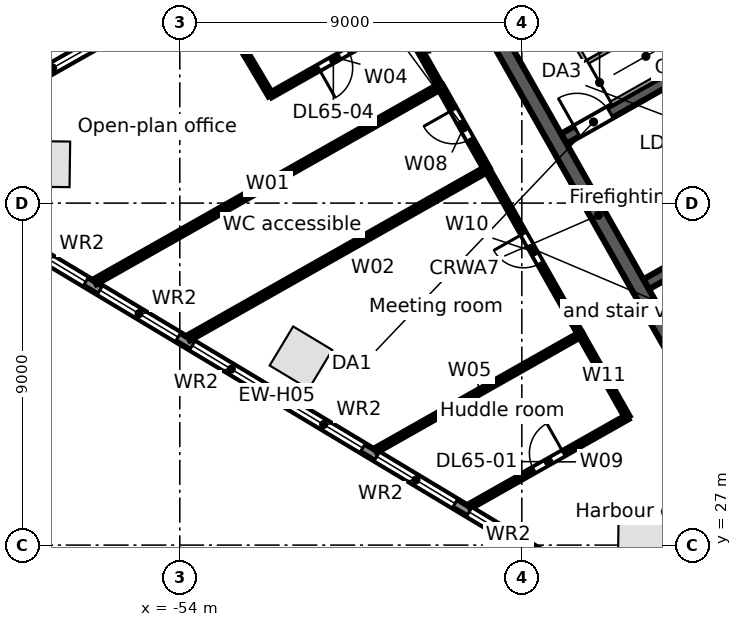
"""IFC4 building model, lengths in metres.
Left out: names, types, materials, properties, quantities, classifications, styles, units other than length and angle.
Written with IfcOpenShell. Run it as: python <this file> out.ifc"""

import sys

from ifc_helpers import new_model, si_unit, direction, frame, frame_2d, origin, origin_2d, place, context, subcontext, project, spatial, rectangle, extrude, element, fill, save


model = new_model("IFC4")
c1 = context("Model", 3, precision=1e-05, world=origin(), true_north=direction((0.0, 1.0)))
c2 = subcontext(c1, "Body", "Model", "MODEL_VIEW")
j1 = project(units=[si_unit("LENGTHUNIT", "METRE"), si_unit("PLANEANGLEUNIT", "RADIAN")], contexts=[c1])
p1 = place(None, origin())
s1 = spatial("IfcSite", under=j1, at=p1, CompositionType="ELEMENT")
p2 = place(p1, origin())
s2 = spatial("IfcBuilding", under=s1, at=p2, CompositionType="ELEMENT")
p3 = place(p2, frame((0.0, 0.0, 293.1)))
s3 = spatial("IfcBuildingStorey", under=s2, at=p3, CompositionType="ELEMENT", Elevation=293.1)
for number, where, z_axis, x_axis in (
    (1, (-57.493, 37.027, 0.0), (0.0, 0.0, 1.0), (-0.013, -1.0, 0.0)),
    (2, (-50.812, 31.931, 0.0), (0.0, 0.0, 1.0), (0.857, -0.515, 0.0)),
    (3, (-41.858, 27.495, 0.0), (0.0, 0.0, 1.0), (1.0, -0.013, 0.0)),
):
    element("IfcColumn", number, at=place(p3, frame(where, z_axis=z_axis, x_axis=x_axis)), inside=s3, PredefinedType="COLUMN", context=c2, shape_type="SweptSolid", body=[
        extrude(rectangle(XDim=1.2, YDim=1.2, at=origin_2d()), origin(), (0.0, 0.0, 1.0), 3.8),
    ])
p4 = place(p3, frame((-58.732, 38.771, 0.0), z_axis=(0.0, 0.0, 1.0), x_axis=(0.870355615581, 0.492423702137, 0.0)))
e4 = element("IfcWall", 4, at=p4, inside=s3, PredefinedType="STANDARD", context=c2, shape_type="SweptSolid", body=[
    extrude(rectangle(XDim=64.052, YDim=0.25, at=frame_2d((32.026, 0.0))), origin(), (0.0, 0.0, 1.0), 3.52),
])
p5 = place(p4, frame((61.259, 0.0, 0.8)))
e5 = element("IfcOpeningElement", 5, at=p5, cuts=e4, PredefinedType="OPENING", context=c2, shape_type="SweptSolid", body=[
    extrude(rectangle(XDim=2.4, YDim=2.2, at=frame_2d((1.2, 1.1))), frame((0.0, 0.135, 0.0), z_axis=(0.0, -1.0, 0.0), x_axis=(1.0, 0.0, 0.0)), (0.0, 0.0, 1.0), 0.27),
])
p6 = place(p4, frame((58.216, 0.0, 0.8)))
e6 = element("IfcOpeningElement", 6, at=p6, cuts=e4, PredefinedType="OPENING", context=c2, shape_type="SweptSolid", body=[
    extrude(rectangle(XDim=2.4, YDim=2.2, at=frame_2d((1.2, 1.1))), frame((0.0, 0.135, 0.0), z_axis=(0.0, -1.0, 0.0), x_axis=(1.0, 0.0, 0.0)), (0.0, 0.0, 1.0), 0.27),
])
p7 = place(p4, frame((55.173, 0.0, 0.8)))
e7 = element("IfcOpeningElement", 7, at=p7, cuts=e4, PredefinedType="OPENING", context=c2, shape_type="SweptSolid", body=[
    extrude(rectangle(XDim=2.4, YDim=2.2, at=frame_2d((1.2, 1.1))), frame((0.0, 0.135, 0.0), z_axis=(0.0, -1.0, 0.0), x_axis=(1.0, 0.0, 0.0)), (0.0, 0.0, 1.0), 0.27),
])
p8 = place(p4, frame((52.129, 0.0, 0.8)))
e8 = element("IfcOpeningElement", 8, at=p8, cuts=e4, PredefinedType="OPENING", context=c2, shape_type="SweptSolid", body=[
    extrude(rectangle(XDim=2.4, YDim=2.2, at=frame_2d((1.2, 1.1))), frame((0.0, 0.135, 0.0), z_axis=(0.0, -1.0, 0.0), x_axis=(1.0, 0.0, 0.0)), (0.0, 0.0, 1.0), 0.27),
])
p9 = place(p4, frame((49.086, 0.0, 0.8)))
e9 = element("IfcOpeningElement", 9, at=p9, cuts=e4, PredefinedType="OPENING", context=c2, shape_type="SweptSolid", body=[
    extrude(rectangle(XDim=2.4, YDim=2.2, at=frame_2d((1.2, 1.1))), frame((0.0, 0.135, 0.0), z_axis=(0.0, -1.0, 0.0), x_axis=(1.0, 0.0, 0.0)), (0.0, 0.0, 1.0), 0.27),
])
p10 = place(p4, frame((46.043, 0.0, 0.8)))
e10 = element("IfcOpeningElement", 10, at=p10, cuts=e4, PredefinedType="OPENING", context=c2, shape_type="SweptSolid", body=[
    extrude(rectangle(XDim=2.4, YDim=2.2, at=frame_2d((1.2, 1.1))), frame((0.0, 0.135, 0.0), z_axis=(0.0, -1.0, 0.0), x_axis=(1.0, 0.0, 0.0)), (0.0, 0.0, 1.0), 0.27),
])
p11 = place(p4, frame((43.0, 0.0, 0.8)))
e11 = element("IfcOpeningElement", 11, at=p11, cuts=e4, PredefinedType="OPENING", context=c2, shape_type="SweptSolid", body=[
    extrude(rectangle(XDim=2.4, YDim=2.2, at=frame_2d((1.2, 1.1))), frame((0.0, 0.135, 0.0), z_axis=(0.0, -1.0, 0.0), x_axis=(1.0, 0.0, 0.0)), (0.0, 0.0, 1.0), 0.27),
])
p12 = place(p4, frame((39.956, 0.0, 0.8)))
e12 = element("IfcOpeningElement", 12, at=p12, cuts=e4, PredefinedType="OPENING", context=c2, shape_type="SweptSolid", body=[
    extrude(rectangle(XDim=2.4, YDim=2.2, at=frame_2d((1.2, 1.1))), frame((0.0, 0.135, 0.0), z_axis=(0.0, -1.0, 0.0), x_axis=(1.0, 0.0, 0.0)), (0.0, 0.0, 1.0), 0.27),
])
p13 = place(p4, frame((36.913, 0.0, 0.8)))
e13 = element("IfcOpeningElement", 13, at=p13, cuts=e4, PredefinedType="OPENING", context=c2, shape_type="SweptSolid", body=[
    extrude(rectangle(XDim=2.4, YDim=2.2, at=frame_2d((1.2, 1.1))), frame((0.0, 0.135, 0.0), z_axis=(0.0, -1.0, 0.0), x_axis=(1.0, 0.0, 0.0)), (0.0, 0.0, 1.0), 0.27),
])
p14 = place(p4, frame((33.87, 0.0, 0.8)))
e14 = element("IfcOpeningElement", 14, at=p14, cuts=e4, PredefinedType="OPENING", context=c2, shape_type="SweptSolid", body=[
    extrude(rectangle(XDim=2.4, YDim=2.2, at=frame_2d((1.2, 1.1))), frame((0.0, 0.135, 0.0), z_axis=(0.0, -1.0, 0.0), x_axis=(1.0, 0.0, 0.0)), (0.0, 0.0, 1.0), 0.27),
])
p15 = place(p4, frame((30.826, 0.0, 0.8)))
e15 = element("IfcOpeningElement", 15, at=p15, cuts=e4, PredefinedType="OPENING", context=c2, shape_type="SweptSolid", body=[
    extrude(rectangle(XDim=2.4, YDim=2.2, at=frame_2d((1.2, 1.1))), frame((0.0, 0.135, 0.0), z_axis=(0.0, -1.0, 0.0), x_axis=(1.0, 0.0, 0.0)), (0.0, 0.0, 1.0), 0.27),
])
p16 = place(p4, frame((27.783, 0.0, 0.8)))
e16 = element("IfcOpeningElement", 16, at=p16, cuts=e4, PredefinedType="OPENING", context=c2, shape_type="SweptSolid", body=[
    extrude(rectangle(XDim=2.4, YDim=2.2, at=frame_2d((1.2, 1.1))), frame((0.0, 0.135, 0.0), z_axis=(0.0, -1.0, 0.0), x_axis=(1.0, 0.0, 0.0)), (0.0, 0.0, 1.0), 0.27),
])
p17 = place(p4, frame((24.74, 0.0, 0.8)))
e17 = element("IfcOpeningElement", 17, at=p17, cuts=e4, PredefinedType="OPENING", context=c2, shape_type="SweptSolid", body=[
    extrude(rectangle(XDim=2.4, YDim=2.2, at=frame_2d((1.2, 1.1))), frame((0.0, 0.135, 0.0), z_axis=(0.0, -1.0, 0.0), x_axis=(1.0, 0.0, 0.0)), (0.0, 0.0, 1.0), 0.27),
])
p18 = place(p4, frame((21.696, 0.0, 0.8)))
e18 = element("IfcOpeningElement", 18, at=p18, cuts=e4, PredefinedType="OPENING", context=c2, shape_type="SweptSolid", body=[
    extrude(rectangle(XDim=2.4, YDim=2.2, at=frame_2d((1.2, 1.1))), frame((0.0, 0.135, 0.0), z_axis=(0.0, -1.0, 0.0), x_axis=(1.0, 0.0, 0.0)), (0.0, 0.0, 1.0), 0.27),
])
p19 = place(p4, frame((18.653, 0.0, 0.8)))
e19 = element("IfcOpeningElement", 19, at=p19, cuts=e4, PredefinedType="OPENING", context=c2, shape_type="SweptSolid", body=[
    extrude(rectangle(XDim=2.4, YDim=2.2, at=frame_2d((1.2, 1.1))), frame((0.0, 0.135, 0.0), z_axis=(0.0, -1.0, 0.0), x_axis=(1.0, 0.0, 0.0)), (0.0, 0.0, 1.0), 0.27),
])
p20 = place(p4, frame((15.61, 0.0, 0.8)))
e20 = element("IfcOpeningElement", 20, at=p20, cuts=e4, PredefinedType="OPENING", context=c2, shape_type="SweptSolid", body=[
    extrude(rectangle(XDim=2.4, YDim=2.2, at=frame_2d((1.2, 1.1))), frame((0.0, 0.135, 0.0), z_axis=(0.0, -1.0, 0.0), x_axis=(1.0, 0.0, 0.0)), (0.0, 0.0, 1.0), 0.27),
])
p21 = place(p4, frame((12.567, 0.0, 0.8)))
e21 = element("IfcOpeningElement", 21, at=p21, cuts=e4, PredefinedType="OPENING", context=c2, shape_type="SweptSolid", body=[
    extrude(rectangle(XDim=2.4, YDim=2.2, at=frame_2d((1.2, 1.1))), frame((0.0, 0.135, 0.0), z_axis=(0.0, -1.0, 0.0), x_axis=(1.0, 0.0, 0.0)), (0.0, 0.0, 1.0), 0.27),
])
p22 = place(p4, frame((9.523, 0.0, 0.8)))
e22 = element("IfcOpeningElement", 22, at=p22, cuts=e4, PredefinedType="OPENING", context=c2, shape_type="SweptSolid", body=[
    extrude(rectangle(XDim=2.4, YDim=2.2, at=frame_2d((1.2, 1.1))), frame((0.0, 0.135, 0.0), z_axis=(0.0, -1.0, 0.0), x_axis=(1.0, 0.0, 0.0)), (0.0, 0.0, 1.0), 0.27),
])
p23 = place(p4, frame((6.48, 0.0, 0.8)))
e23 = element("IfcOpeningElement", 23, at=p23, cuts=e4, PredefinedType="OPENING", context=c2, shape_type="SweptSolid", body=[
    extrude(rectangle(XDim=2.4, YDim=2.2, at=frame_2d((1.2, 1.1))), frame((0.0, 0.135, 0.0), z_axis=(0.0, -1.0, 0.0), x_axis=(1.0, 0.0, 0.0)), (0.0, 0.0, 1.0), 0.27),
])
p24 = place(p4, frame((3.437, 0.0, 0.8)))
e24 = element("IfcOpeningElement", 24, at=p24, cuts=e4, PredefinedType="OPENING", context=c2, shape_type="SweptSolid", body=[
    extrude(rectangle(XDim=2.4, YDim=2.2, at=frame_2d((1.2, 1.1))), frame((0.0, 0.135, 0.0), z_axis=(0.0, -1.0, 0.0), x_axis=(1.0, 0.0, 0.0)), (0.0, 0.0, 1.0), 0.27),
])
p25 = place(p4, frame((0.393, 0.0, 0.8)))
e25 = element("IfcOpeningElement", 25, at=p25, cuts=e4, PredefinedType="OPENING", context=c2, shape_type="SweptSolid", body=[
    extrude(rectangle(XDim=2.4, YDim=2.2, at=frame_2d((1.2, 1.1))), frame((0.0, 0.135, 0.0), z_axis=(0.0, -1.0, 0.0), x_axis=(1.0, 0.0, 0.0)), (0.0, 0.0, 1.0), 0.27),
])
p26 = place(p3, frame((-44.115, 26.507, 0.0), z_axis=(0.0, 0.0, 1.0), x_axis=(-0.857166583633, 0.515039268311, 0.0)))
e26 = element("IfcWall", 26, at=p26, inside=s3, PredefinedType="STANDARD", context=c2, shape_type="SweptSolid", body=[
    extrude(rectangle(XDim=17.106, YDim=0.25, at=frame_2d((8.553, 0.0))), origin(), (0.0, 0.0, 1.0), 3.52),
])
p27 = place(p26, frame((14.417, 0.0, 0.8)))
e27 = element("IfcOpeningElement", 27, at=p27, cuts=e26, PredefinedType="OPENING", context=c2, shape_type="SweptSolid", body=[
    extrude(rectangle(XDim=2.4, YDim=2.2, at=frame_2d((1.2, 1.1))), frame((0.0, 0.135, 0.0), z_axis=(0.0, -1.0, 0.0), x_axis=(1.0, 0.0, 0.0)), (0.0, 0.0, 1.0), 0.27),
])
p28 = place(p26, frame((11.584, 0.0, 0.8)))
e28 = element("IfcOpeningElement", 28, at=p28, cuts=e26, PredefinedType="OPENING", context=c2, shape_type="SweptSolid", body=[
    extrude(rectangle(XDim=2.4, YDim=2.2, at=frame_2d((1.2, 1.1))), frame((0.0, 0.135, 0.0), z_axis=(0.0, -1.0, 0.0), x_axis=(1.0, 0.0, 0.0)), (0.0, 0.0, 1.0), 0.27),
])
p29 = place(p26, frame((8.75, 0.0, 0.8)))
e29 = element("IfcOpeningElement", 29, at=p29, cuts=e26, PredefinedType="OPENING", context=c2, shape_type="SweptSolid", body=[
    extrude(rectangle(XDim=2.4, YDim=2.2, at=frame_2d((1.2, 1.1))), frame((0.0, 0.135, 0.0), z_axis=(0.0, -1.0, 0.0), x_axis=(1.0, 0.0, 0.0)), (0.0, 0.0, 1.0), 0.27),
])
p30 = place(p26, frame((5.917, 0.0, 0.8)))
e30 = element("IfcOpeningElement", 30, at=p30, cuts=e26, PredefinedType="OPENING", context=c2, shape_type="SweptSolid", body=[
    extrude(rectangle(XDim=2.4, YDim=2.2, at=frame_2d((1.2, 1.1))), frame((0.0, 0.135, 0.0), z_axis=(0.0, -1.0, 0.0), x_axis=(1.0, 0.0, 0.0)), (0.0, 0.0, 1.0), 0.27),
])
p31 = place(p26, frame((3.084, 0.0, 0.8)))
e31 = element("IfcOpeningElement", 31, at=p31, cuts=e26, PredefinedType="OPENING", context=c2, shape_type="SweptSolid", body=[
    extrude(rectangle(XDim=2.4, YDim=2.2, at=frame_2d((1.2, 1.1))), frame((0.0, 0.135, 0.0), z_axis=(0.0, -1.0, 0.0), x_axis=(1.0, 0.0, 0.0)), (0.0, 0.0, 1.0), 0.27),
])
p32 = place(p26, frame((0.25, 0.0, 0.8)))
e32 = element("IfcOpeningElement", 32, at=p32, cuts=e26, PredefinedType="OPENING", context=c2, shape_type="SweptSolid", body=[
    extrude(rectangle(XDim=2.4, YDim=2.2, at=frame_2d((1.2, 1.1))), frame((0.0, 0.135, 0.0), z_axis=(0.0, -1.0, 0.0), x_axis=(1.0, 0.0, 0.0)), (0.0, 0.0, 1.0), 0.27),
])
p33 = place(p3, frame((-41.73, 33.863, 0.0), z_axis=(0.0, 0.0, 1.0), x_axis=(0.870350800578, 0.492432212525, 0.0)))
e33 = element("IfcWall", 33, at=p33, inside=s3, PredefinedType="SOLIDWALL", context=c2, shape_type="SweptSolid", body=[
    extrude(rectangle(XDim=6.2, YDim=0.3, at=frame_2d((3.1, 0.0))), origin(), (0.0, 0.0, 1.0), 3.52),
])
p34 = place(p33, frame((1.3, 0.0, 0.0)))
e34 = element("IfcOpeningElement", 34, at=p34, cuts=e33, PredefinedType="OPENING", context=c2, shape_type="SweptSolid", body=[
    extrude(rectangle(XDim=1.1, YDim=2.1, at=frame_2d((0.55, 1.05))), frame((0.0, 0.16, 0.0), z_axis=(0.0, -1.0, 0.0), x_axis=(1.0, 0.0, 0.0)), (0.0, 0.0, 1.0), 0.32),
])
p35 = place(p33, frame((4.95, 0.0, 0.0)))
e35 = element("IfcOpeningElement", 35, at=p35, cuts=e33, PredefinedType="OPENING", context=c2, shape_type="SweptSolid", body=[
    extrude(rectangle(XDim=0.9, YDim=2.1, at=frame_2d((0.45, 1.05))), frame((0.0, 0.16, 0.0), z_axis=(0.0, -1.0, 0.0), x_axis=(1.0, 0.0, 0.0)), (0.0, 0.0, 1.0), 0.32),
])
p36 = place(p3, frame((-43.897, 37.692, 0.0), z_axis=(0.0, 0.0, 1.0), x_axis=(0.870356351998, 0.492422400523, 0.0)))
e36 = element("IfcWall", 36, at=p36, inside=s3, PredefinedType="SOLIDWALL", context=c2, shape_type="SweptSolid", body=[
    extrude(rectangle(XDim=7.6, YDim=0.3, at=frame_2d((3.8, 0.0))), origin(), (0.0, 0.0, 1.0), 3.52),
])
p37 = place(p36, frame((0.4, 0.0, 0.0)))
e37 = element("IfcOpeningElement", 37, at=p37, cuts=e36, PredefinedType="OPENING", context=c2, shape_type="SweptSolid", body=[
    extrude(rectangle(XDim=1.0, YDim=2.1, at=frame_2d((0.5, 1.05))), frame((0.0, 0.16, 0.0), z_axis=(0.0, -1.0, 0.0), x_axis=(1.0, 0.0, 0.0)), (0.0, 0.0, 1.0), 0.32),
])
p38 = place(p3, frame((-46.238, 41.423, 0.0), z_axis=(0.0, 0.0, 1.0), x_axis=(0.492421663121, -0.870356769198, 0.0)))
e38 = element("IfcWall", 38, at=p38, inside=s3, PredefinedType="SOLIDWALL", context=c2, shape_type="SweptSolid", body=[
    extrude(rectangle(XDim=13.2, YDim=0.4, at=frame_2d((6.6, 0.0))), origin(), (0.0, 0.0, 1.0), 3.52),
])
p39 = place(p3, frame((-56.229, 33.932, 0.0), z_axis=(0.0, 0.0, 1.0), x_axis=(0.870363189886, 0.492410314364, 0.0)))
e39 = element("IfcWall", 39, at=p39, inside=s3, PredefinedType="PARTITIONING", context=c2, shape_type="SweptSolid", body=[
    extrude(rectangle(XDim=10.435, YDim=0.15, at=frame_2d((5.217, 0.0))), origin(), (0.0, 0.0, 1.0), 2.8),
])
p40 = place(p3, frame((-53.767, 32.453, 0.0), z_axis=(0.0, 0.0, 1.0), x_axis=(0.870345499828, 0.492441581235, 0.0)))
e40 = element("IfcWall", 40, at=p40, inside=s3, PredefinedType="PARTITIONING", context=c2, shape_type="SweptSolid", body=[
    extrude(rectangle(XDim=9.021, YDim=0.15, at=frame_2d((4.51, 0.0))), origin(), (0.0, 0.0, 1.0), 2.8),
])
p41 = place(p3, frame((-53.309, 41.696, 0.0), z_axis=(0.0, 0.0, 1.0), x_axis=(0.510739180143, -0.859735709312, 0.0)))
e41 = element("IfcWall", 41, at=p41, inside=s3, PredefinedType="PARTITIONING", context=c2, shape_type="SweptSolid", body=[
    extrude(rectangle(XDim=3.321, YDim=0.125, at=frame_2d((1.66, 0.0))), origin(), (0.0, 0.0, 1.0), 2.894),
])
p42 = place(p3, frame((-51.613, 38.841, 0.0), z_axis=(0.0, 0.0, 1.0), x_axis=(0.870297830159, 0.492525823506, 0.0)))
e42 = element("IfcWall", 42, at=p42, inside=s3, PredefinedType="PARTITIONING", context=c2, shape_type="SweptSolid", body=[
    extrude(rectangle(XDim=4.0, YDim=0.125, at=frame_2d((2.0, 0.0))), origin(), (0.0, 0.0, 1.0), 2.8),
])
p43 = place(p42, frame((1.45, 0.0, 0.0)))
e43 = element("IfcOpeningElement", 43, at=p43, cuts=e42, PredefinedType="OPENING", context=c2, shape_type="SweptSolid", body=[
    extrude(rectangle(XDim=0.9, YDim=2.1, at=frame_2d((0.45, 1.05))), frame((0.0, 0.073, 0.0), z_axis=(0.0, -1.0, 0.0), x_axis=(1.0, 0.0, 0.0)), (0.0, 0.0, 1.0), 0.145),
])
p44 = place(p3, frame((-48.843, 29.494, 0.0), z_axis=(0.0, 0.0, 1.0), x_axis=(0.870343909083, 0.492444392721, 0.0)))
e44 = element("IfcWall", 44, at=p44, inside=s3, PredefinedType="PARTITIONING", context=c2, shape_type="SweptSolid", body=[
    extrude(rectangle(XDim=6.192, YDim=0.125, at=frame_2d((3.096, 0.0))), origin(), (0.0, 0.0, 1.0), 2.8),
])
p45 = place(p3, frame((-48.132, 40.811, 0.0), z_axis=(0.0, 0.0, 1.0), x_axis=(0.492467412326, -0.870330884088, 0.0)))
e45 = element("IfcWall", 45, at=p45, inside=s3, PredefinedType="PARTITIONING", context=c2, shape_type="SweptSolid", body=[
    extrude(rectangle(XDim=2.0, YDim=0.125, at=frame_2d((1.0, 0.0))), origin(), (0.0, 0.0, 1.0), 3.52),
])
p46 = place(p3, frame((-47.147, 39.07, 0.0), z_axis=(0.0, 0.0, 1.0), x_axis=(0.492536798944, -0.870291618761, 0.0)))
e46 = element("IfcWall", 46, at=p46, inside=s3, PredefinedType="PARTITIONING", context=c2, shape_type="SweptSolid", body=[
    extrude(rectangle(XDim=2.499, YDim=0.15, at=frame_2d((1.25, 0.0))), origin(), (0.0, 0.0, 1.0), 3.52),
])
p47 = place(p46, frame((0.7, 0.0, 0.0)))
e47 = element("IfcOpeningElement", 47, at=p47, cuts=e46, PredefinedType="OPENING", context=c2, shape_type="SweptSolid", body=[
    extrude(rectangle(XDim=0.9, YDim=2.1, at=frame_2d((0.45, 1.05))), frame((0.0, 0.085, 0.0), z_axis=(0.0, -1.0, 0.0), x_axis=(1.0, 0.0, 0.0)), (0.0, 0.0, 1.0), 0.17),
])
p48 = place(p3, frame((-46.381, 28.015, 0.0), z_axis=(0.0, 0.0, 1.0), x_axis=(0.870404795821, 0.49233676626, 0.0)))
e48 = element("IfcWall", 48, at=p48, inside=s3, PredefinedType="PARTITIONING", context=c2, shape_type="SweptSolid", body=[
    extrude(rectangle(XDim=4.777, YDim=0.125, at=frame_2d((2.389, 0.0))), origin(), (0.0, 0.0, 1.0), 2.8),
])
p49 = place(p48, frame((1.95, 0.0, 0.0)))
e49 = element("IfcOpeningElement", 49, at=p49, cuts=e48, PredefinedType="OPENING", context=c2, shape_type="SweptSolid", body=[
    extrude(rectangle(XDim=0.9, YDim=2.1, at=frame_2d((0.45, 1.05))), frame((0.0, 0.073, 0.0), z_axis=(0.0, -1.0, 0.0), x_axis=(1.0, 0.0, 0.0)), (0.0, 0.0, 1.0), 0.145),
])
p50 = place(p3, frame((-45.916, 36.895, 0.0), z_axis=(0.0, 0.0, 1.0), x_axis=(0.492369352746, -0.870386362759, 0.0)))
e50 = element("IfcWall", 50, at=p50, inside=s3, PredefinedType="PARTITIONING", context=c2, shape_type="SweptSolid", body=[
    extrude(rectangle(XDim=5.0, YDim=0.125, at=frame_2d((2.5, 0.0))), origin(), (0.0, 0.0, 1.0), 2.8),
])
p51 = place(p50, frame((1.95, 0.0, 0.0)))
e51 = element("IfcOpeningElement", 51, at=p51, cuts=e50, PredefinedType="OPENING", context=c2, shape_type="SweptSolid", body=[
    extrude(rectangle(XDim=0.9, YDim=2.1, at=frame_2d((0.45, 1.05))), frame((0.0, 0.073, 0.0), z_axis=(0.0, -1.0, 0.0), x_axis=(1.0, 0.0, 0.0)), (0.0, 0.0, 1.0), 0.145),
])
p52 = place(p3, frame((-43.454, 32.543, 0.0), z_axis=(0.0, 0.0, 1.0), x_axis=(0.49244332707, -0.870344512032, 0.0)))
e52 = element("IfcWall", 52, at=p52, inside=s3, PredefinedType="PARTITIONING", context=c2, shape_type="SweptSolid", body=[
    extrude(rectangle(XDim=2.5, YDim=0.125, at=frame_2d((1.25, 0.0))), origin(), (0.0, 0.0, 1.0), 3.52),
])
p53 = place(p25, origin())
e53 = element("IfcWindow", 53, at=p53, inside=s3, PartitioningType="SINGLE_PANEL", PredefinedType="WINDOW", context=c2, shape_type="SweptSolid", body=[
    extrude(rectangle(XDim=2.4, YDim=2.2, at=frame_2d((1.2, 1.1))), frame((0.0, 0.03, 0.0), z_axis=(0.0, -1.0, 0.0), x_axis=(1.0, 0.0, 0.0)), (0.0, 0.0, 1.0), 0.06),
])
fill(e25, e53)
p54 = place(p27, origin())
e54 = element("IfcWindow", 54, at=p54, inside=s3, PartitioningType="SINGLE_PANEL", PredefinedType="WINDOW", context=c2, shape_type="SweptSolid", body=[
    extrude(rectangle(XDim=2.4, YDim=2.2, at=frame_2d((1.2, 1.1))), frame((0.0, 0.03, 0.0), z_axis=(0.0, -1.0, 0.0), x_axis=(1.0, 0.0, 0.0)), (0.0, 0.0, 1.0), 0.06),
])
fill(e27, e54)
p55 = place(p28, origin())
e55 = element("IfcWindow", 55, at=p55, inside=s3, PartitioningType="SINGLE_PANEL", PredefinedType="WINDOW", context=c2, shape_type="SweptSolid", body=[
    extrude(rectangle(XDim=2.4, YDim=2.2, at=frame_2d((1.2, 1.1))), frame((0.0, 0.03, 0.0), z_axis=(0.0, -1.0, 0.0), x_axis=(1.0, 0.0, 0.0)), (0.0, 0.0, 1.0), 0.06),
])
fill(e28, e55)
p56 = place(p29, origin())
e56 = element("IfcWindow", 56, at=p56, inside=s3, PartitioningType="SINGLE_PANEL", PredefinedType="WINDOW", context=c2, shape_type="SweptSolid", body=[
    extrude(rectangle(XDim=2.4, YDim=2.2, at=frame_2d((1.2, 1.1))), frame((0.0, 0.03, 0.0), z_axis=(0.0, -1.0, 0.0), x_axis=(1.0, 0.0, 0.0)), (0.0, 0.0, 1.0), 0.06),
])
fill(e29, e56)
p57 = place(p30, origin())
e57 = element("IfcWindow", 57, at=p57, inside=s3, PartitioningType="SINGLE_PANEL", PredefinedType="WINDOW", context=c2, shape_type="SweptSolid", body=[
    extrude(rectangle(XDim=2.4, YDim=2.2, at=frame_2d((1.2, 1.1))), frame((0.0, 0.03, 0.0), z_axis=(0.0, -1.0, 0.0), x_axis=(1.0, 0.0, 0.0)), (0.0, 0.0, 1.0), 0.06),
])
fill(e30, e57)
p58 = place(p31, origin())
e58 = element("IfcWindow", 58, at=p58, inside=s3, PartitioningType="SINGLE_PANEL", PredefinedType="WINDOW", context=c2, shape_type="SweptSolid", body=[
    extrude(rectangle(XDim=2.4, YDim=2.2, at=frame_2d((1.2, 1.1))), frame((0.0, 0.03, 0.0), z_axis=(0.0, -1.0, 0.0), x_axis=(1.0, 0.0, 0.0)), (0.0, 0.0, 1.0), 0.06),
])
fill(e31, e58)
p59 = place(p32, origin())
e59 = element("IfcWindow", 59, at=p59, inside=s3, PartitioningType="SINGLE_PANEL", PredefinedType="WINDOW", context=c2, shape_type="SweptSolid", body=[
    extrude(rectangle(XDim=2.4, YDim=2.2, at=frame_2d((1.2, 1.1))), frame((0.0, 0.03, 0.0), z_axis=(0.0, -1.0, 0.0), x_axis=(1.0, 0.0, 0.0)), (0.0, 0.0, 1.0), 0.06),
])
fill(e32, e59)
p60 = place(p37, origin())
e60 = element("IfcDoor", 60, at=p60, inside=s3, OperationType="SINGLE_SWING_LEFT", PredefinedType="DOOR", context=c2, shape_type="SweptSolid", body=[
    extrude(rectangle(XDim=1.0, YDim=2.1, at=frame_2d((0.5, 1.05))), frame((0.0, 0.025, 0.0), z_axis=(0.0, -1.0, 0.0), x_axis=(1.0, 0.0, 0.0)), (0.0, 0.0, 1.0), 0.05),
])
fill(e37, e60)
p61 = place(p49, origin())
e61 = element("IfcDoor", 61, at=p61, inside=s3, OperationType="SINGLE_SWING_RIGHT", PredefinedType="DOOR", context=c2, shape_type="SweptSolid", body=[
    extrude(rectangle(XDim=0.9, YDim=2.1, at=frame_2d((0.45, 1.05))), frame((0.0, 0.025, 0.0), z_axis=(0.0, -1.0, 0.0), x_axis=(1.0, 0.0, 0.0)), (0.0, 0.0, 1.0), 0.05),
])
fill(e49, e61)
p62 = place(p51, frame((0.9, 0.0, 0.0), z_axis=(0.0, 0.0, 1.0), x_axis=(-1.0, 0.0, 0.0)))
e62 = element("IfcDoor", 62, at=p62, inside=s3, OperationType="SINGLE_SWING_RIGHT", PredefinedType="DOOR", context=c2, shape_type="SweptSolid", body=[
    extrude(rectangle(XDim=0.9, YDim=2.1, at=frame_2d((0.45, 1.05))), frame((0.0, 0.025, 0.0), z_axis=(0.0, -1.0, 0.0), x_axis=(1.0, 0.0, 0.0)), (0.0, 0.0, 1.0), 0.05),
])
fill(e51, e62)
p63 = place(p47, frame((0.9, 0.0, 0.0), z_axis=(0.0, 0.0, 1.0), x_axis=(-1.0, 0.0, 0.0)))
e63 = element("IfcDoor", 63, at=p63, inside=s3, OperationType="SINGLE_SWING_RIGHT", PredefinedType="DOOR", context=c2, shape_type="SweptSolid", body=[
    extrude(rectangle(XDim=0.9, YDim=2.1, at=frame_2d((0.45, 1.05))), frame((0.0, 0.025, 0.0), z_axis=(0.0, -1.0, 0.0), x_axis=(1.0, 0.0, 0.0)), (0.0, 0.0, 1.0), 0.05),
])
fill(e47, e63)
p64 = place(p43, frame((0.9, 0.0, 0.0), z_axis=(0.0, 0.0, 1.0), x_axis=(-1.0, 0.0, 0.0)))
e64 = element("IfcDoor", 64, at=p64, inside=s3, OperationType="SINGLE_SWING_RIGHT", PredefinedType="DOOR", context=c2, shape_type="SweptSolid", body=[
    extrude(rectangle(XDim=0.9, YDim=2.1, at=frame_2d((0.45, 1.05))), frame((0.0, 0.025, 0.0), z_axis=(0.0, -1.0, 0.0), x_axis=(1.0, 0.0, 0.0)), (0.0, 0.0, 1.0), 0.05),
])
fill(e43, e64)
save(model, sys.argv[1])
